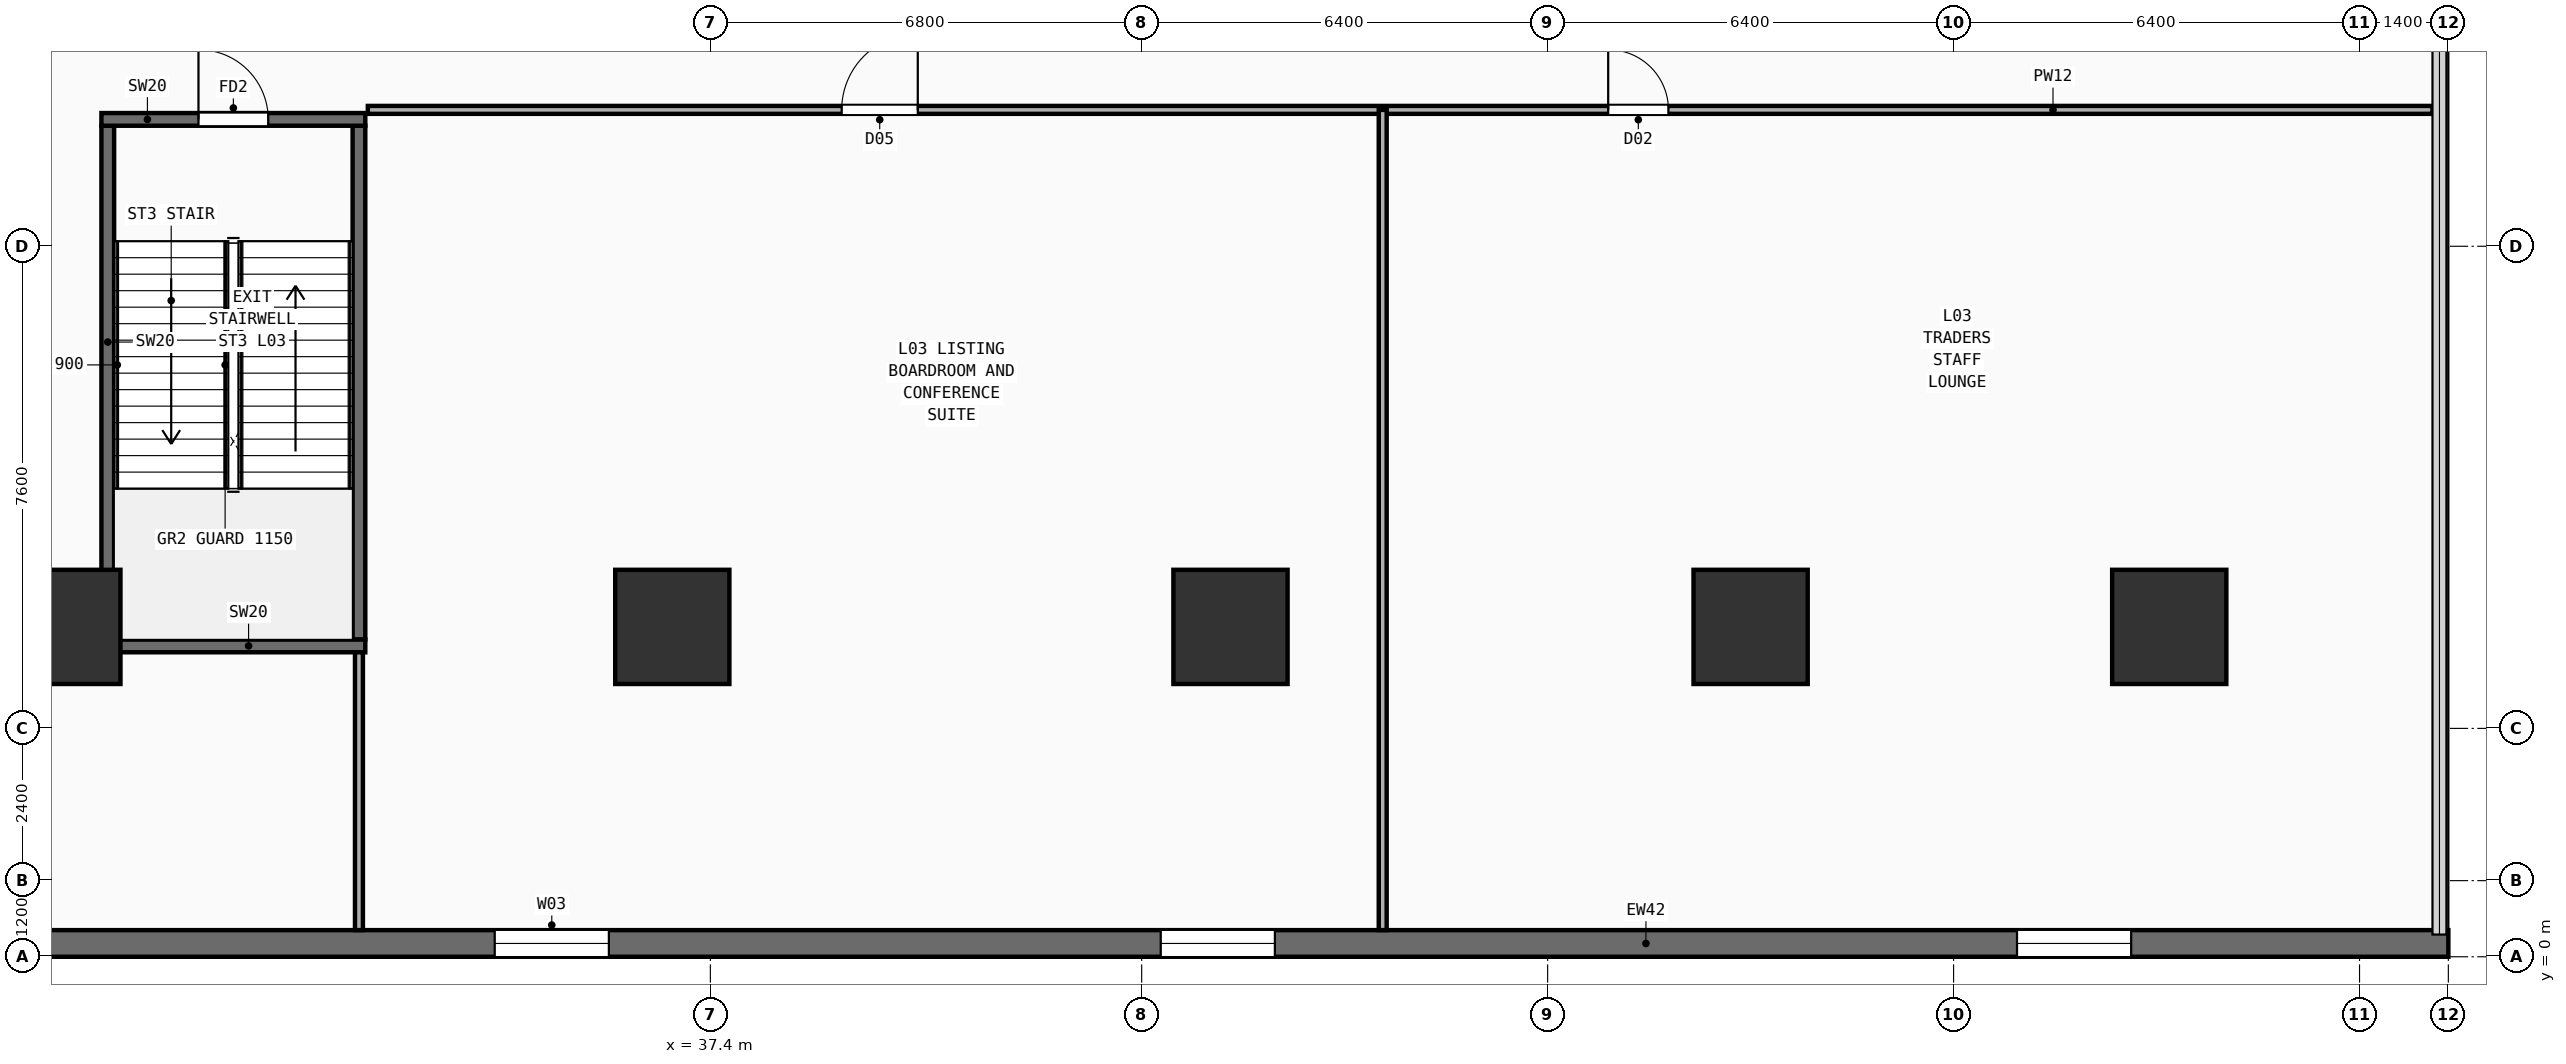
"""IFC4 building model, lengths in metres.
Left out: names, types, materials, properties, quantities, classifications, styles, units other than length and angle.
Written with IfcOpenShell. Run it as: python <this file> out.ifc"""

import sys

from ifc_helpers import new_model, si_unit, direction, frame, frame_2d, origin, origin_2d, place, context, subcontext, project, spatial, rectangle, extrude, element, fill, save


model = new_model("IFC4")
c1 = context("Model", 3, precision=1e-05, world=origin(), true_north=direction((0.0, 1.0)))
c2 = subcontext(c1, "Body", "Model", "MODEL_VIEW")
j1 = project(units=[si_unit("LENGTHUNIT", "METRE"), si_unit("PLANEANGLEUNIT", "RADIAN")], contexts=[c1])
p1 = place(None, origin())
s1 = spatial("IfcSite", under=j1, at=p1, CompositionType="ELEMENT")
p2 = place(p1, origin())
s2 = spatial("IfcBuilding", under=s1, at=p2, CompositionType="ELEMENT")
p3 = place(p2, frame((0.0, 0.0, 10.4)))
s3 = spatial("IfcBuildingStorey", under=s2, at=p3, CompositionType="ELEMENT", Elevation=10.4)
for number, where, z_axis, x_axis in (
    (1, (27.2, 5.2, 0.0), (0.0, 0.0, 1.0), (1.0, 0.0, 0.0)),
    (2, (36.8, 5.2, 0.0), (0.0, 0.0, 1.0), (1.0, 0.0, 0.0)),
    (3, (45.6, 5.2, 0.0), (0.0, 0.0, 1.0), (1.0, 0.0, 0.0)),
    (4, (53.8, 5.2, 0.0), (0.0, 0.0, 1.0), (1.0, 0.0, 0.0)),
    (5, (60.4, 5.2, 0.0), (0.0, 0.0, 1.0), (1.0, 0.0, 0.0)),
):
    element("IfcColumn", number, at=place(p3, frame(where, z_axis=z_axis, x_axis=x_axis)), inside=s3, PredefinedType="COLUMN", context=c2, shape_type="SweptSolid", body=[
        extrude(rectangle(XDim=1.8, YDim=1.8, at=origin_2d()), origin(), (0.0, 0.0, 1.0), 4.46),
    ])
p4 = place(p3, frame((0.0, 0.21, 0.0), z_axis=(0.0, 0.0, 1.0), x_axis=(1.0, 0.0, 0.0)))
e6 = element("IfcWall", 6, at=p4, inside=s3, PredefinedType="SOLIDWALL", context=c2, shape_type="SweptSolid", body=[
    extrude(rectangle(XDim=64.8, YDim=0.42, at=frame_2d((32.4, 0.0))), origin(), (0.0, 0.0, 1.0), 4.46),
])
p5 = place(p4, frame((8.0, 0.0, 0.95)))
e7 = element("IfcOpeningElement", 7, at=p5, cuts=e6, PredefinedType="OPENING", context=c2, shape_type="SweptSolid", body=[
    extrude(rectangle(XDim=1.8, YDim=2.1, at=frame_2d((0.9, 1.05))), frame((0.0, 0.22, 0.0), z_axis=(0.0, -1.0, 0.0), x_axis=(1.0, 0.0, 0.0)), (0.0, 0.0, 1.0), 0.44),
])
p6 = place(p4, frame((16.0, 0.0, 0.95)))
e8 = element("IfcOpeningElement", 8, at=p6, cuts=e6, PredefinedType="OPENING", context=c2, shape_type="SweptSolid", body=[
    extrude(rectangle(XDim=1.8, YDim=2.1, at=frame_2d((0.9, 1.05))), frame((0.0, 0.22, 0.0), z_axis=(0.0, -1.0, 0.0), x_axis=(1.0, 0.0, 0.0)), (0.0, 0.0, 1.0), 0.44),
])
p7 = place(p4, frame((24.0, 0.0, 0.95)))
e9 = element("IfcOpeningElement", 9, at=p7, cuts=e6, PredefinedType="OPENING", context=c2, shape_type="SweptSolid", body=[
    extrude(rectangle(XDim=1.8, YDim=2.1, at=frame_2d((0.9, 1.05))), frame((0.0, 0.22, 0.0), z_axis=(0.0, -1.0, 0.0), x_axis=(1.0, 0.0, 0.0)), (0.0, 0.0, 1.0), 0.44),
])
p8 = place(p4, frame((34.0, 0.0, 0.95)))
e10 = element("IfcOpeningElement", 10, at=p8, cuts=e6, PredefinedType="OPENING", context=c2, shape_type="SweptSolid", body=[
    extrude(rectangle(XDim=1.8, YDim=2.1, at=frame_2d((0.9, 1.05))), frame((0.0, 0.22, 0.0), z_axis=(0.0, -1.0, 0.0), x_axis=(1.0, 0.0, 0.0)), (0.0, 0.0, 1.0), 0.44),
])
p9 = place(p4, frame((44.5, 0.0, 0.95)))
e11 = element("IfcOpeningElement", 11, at=p9, cuts=e6, PredefinedType="OPENING", context=c2, shape_type="SweptSolid", body=[
    extrude(rectangle(XDim=1.8, YDim=2.1, at=frame_2d((0.9, 1.05))), frame((0.0, 0.22, 0.0), z_axis=(0.0, -1.0, 0.0), x_axis=(1.0, 0.0, 0.0)), (0.0, 0.0, 1.0), 0.44),
])
p10 = place(p4, frame((58.0, 0.0, 0.95)))
e12 = element("IfcOpeningElement", 12, at=p10, cuts=e6, PredefinedType="OPENING", context=c2, shape_type="SweptSolid", body=[
    extrude(rectangle(XDim=1.8, YDim=2.1, at=frame_2d((0.9, 1.05))), frame((0.0, 0.22, 0.0), z_axis=(0.0, -1.0, 0.0), x_axis=(1.0, 0.0, 0.0)), (0.0, 0.0, 1.0), 0.44),
])
for number, where, z_axis, x_axis in (
    (13, (27.9, 5.0, 0.0), (0.0, 0.0, 1.0), (0.0, 1.0, 0.0)),
    (14, (31.86, 5.0, 0.0), (0.0, 0.0, 1.0), (0.0, 1.0, 0.0)),
):
    element("IfcWall", number, at=place(p3, frame(where, z_axis=z_axis, x_axis=x_axis)), inside=s3, PredefinedType="SHEAR", context=c2, shape_type="SweptSolid", body=[
        extrude(rectangle(XDim=8.1, YDim=0.2, at=frame_2d((4.05, 0.0))), origin(), (0.0, 0.0, 1.0), 4.46),
    ])
p11 = place(p3, frame((27.8, 4.9, 0.0), z_axis=(0.0, 0.0, 1.0), x_axis=(1.0, 0.0, 0.0)))
e15 = element("IfcWall", 15, at=p11, inside=s3, PredefinedType="SHEAR", context=c2, shape_type="SweptSolid", body=[
    extrude(rectangle(XDim=4.16, YDim=0.2, at=frame_2d((2.08, 0.0))), origin(), (0.0, 0.0, 1.0), 4.46),
])
p12 = place(p3, frame((27.8, 13.2, 0.0), z_axis=(0.0, 0.0, 1.0), x_axis=(1.0, 0.0, 0.0)))
e16 = element("IfcWall", 16, at=p12, inside=s3, PredefinedType="SHEAR", context=c2, shape_type="SweptSolid", body=[
    extrude(rectangle(XDim=4.16, YDim=0.2, at=frame_2d((2.08, 0.0))), origin(), (0.0, 0.0, 1.0), 4.46),
])
p13 = place(p12, frame((1.53, 0.0, 0.0)))
e17 = element("IfcOpeningElement", 17, at=p13, cuts=e16, PredefinedType="OPENING", context=c2, shape_type="SweptSolid", body=[
    extrude(rectangle(XDim=1.1, YDim=2.2, at=frame_2d((0.55, 1.1))), frame((0.0, 0.11, 0.0), z_axis=(0.0, -1.0, 0.0), x_axis=(1.0, 0.0, 0.0)), (0.0, 0.0, 1.0), 0.22),
])
p14 = place(p3, frame((32.0, 13.35, 0.0), z_axis=(0.0, 0.0, 1.0), x_axis=(1.0, 0.0, 0.0)))
e18 = element("IfcWall", 18, at=p14, inside=s3, PredefinedType="PARTITIONING", context=c2, shape_type="SweptSolid", body=[
    extrude(rectangle(XDim=32.55, YDim=0.125, at=frame_2d((16.275, 0.0))), origin(), (0.0, 0.0, 1.0), 3.96),
])
p15 = place(p14, frame((7.47, 0.0, 0.0)))
e19 = element("IfcOpeningElement", 19, at=p15, cuts=e18, PredefinedType="OPENING", context=c2, shape_type="SweptSolid", body=[
    extrude(rectangle(XDim=1.2, YDim=2.25, at=frame_2d((0.6, 1.125))), frame((0.0, 0.073, 0.0), z_axis=(0.0, -1.0, 0.0), x_axis=(1.0, 0.0, 0.0)), (0.0, 0.0, 1.0), 0.145),
])
p16 = place(p14, frame((19.555, 0.0, 0.0)))
e20 = element("IfcOpeningElement", 20, at=p16, cuts=e18, PredefinedType="OPENING", context=c2, shape_type="SweptSolid", body=[
    extrude(rectangle(XDim=0.95, YDim=2.15, at=frame_2d((0.475, 1.075))), frame((0.0, 0.073, 0.0), z_axis=(0.0, -1.0, 0.0), x_axis=(1.0, 0.0, 0.0)), (0.0, 0.0, 1.0), 0.145),
])
p17 = place(p3, frame((31.86, 0.42, 0.0), z_axis=(0.0, 0.0, 1.0), x_axis=(0.0, 1.0, 0.0)))
e21 = element("IfcWall", 21, at=p17, inside=s3, PredefinedType="PARTITIONING", context=c2, shape_type="SweptSolid", body=[
    extrude(rectangle(XDim=4.38, YDim=0.125, at=frame_2d((2.19, 0.0))), origin(), (0.0, 0.0, 1.0), 4.46),
])
p18 = place(p3, frame((48.0, 0.42, 0.0), z_axis=(0.0, 0.0, 1.0), x_axis=(0.0, 1.0, 0.0)))
e22 = element("IfcWall", 22, at=p18, inside=s3, PredefinedType="PARTITIONING", context=c2, shape_type="SweptSolid", body=[
    extrude(rectangle(XDim=12.93, YDim=0.125, at=frame_2d((6.465, 0.0))), origin(), (0.0, 0.0, 1.0), 4.46),
])
p19 = place(p8, origin())
e23 = element("IfcWindow", 23, at=p19, inside=s3, PartitioningType="SINGLE_PANEL", PredefinedType="WINDOW", context=c2, shape_type="SweptSolid", body=[
    extrude(rectangle(XDim=1.8, YDim=2.1, at=frame_2d((0.9, 1.05))), frame((0.0, 0.03, 0.0), z_axis=(0.0, -1.0, 0.0), x_axis=(1.0, 0.0, 0.0)), (0.0, 0.0, 1.0), 0.06),
])
fill(e10, e23)
p20 = place(p9, origin())
e24 = element("IfcWindow", 24, at=p20, inside=s3, PartitioningType="SINGLE_PANEL", PredefinedType="WINDOW", context=c2, shape_type="SweptSolid", body=[
    extrude(rectangle(XDim=1.8, YDim=2.1, at=frame_2d((0.9, 1.05))), frame((0.0, 0.03, 0.0), z_axis=(0.0, -1.0, 0.0), x_axis=(1.0, 0.0, 0.0)), (0.0, 0.0, 1.0), 0.06),
])
fill(e11, e24)
p21 = place(p10, origin())
e25 = element("IfcWindow", 25, at=p21, inside=s3, PartitioningType="SINGLE_PANEL", PredefinedType="WINDOW", context=c2, shape_type="SweptSolid", body=[
    extrude(rectangle(XDim=1.8, YDim=2.1, at=frame_2d((0.9, 1.05))), frame((0.0, 0.03, 0.0), z_axis=(0.0, -1.0, 0.0), x_axis=(1.0, 0.0, 0.0)), (0.0, 0.0, 1.0), 0.06),
])
fill(e12, e25)
p22 = place(p13, frame((1.1, 0.0, 0.0), z_axis=(0.0, 0.0, 1.0), x_axis=(-1.0, 0.0, 0.0)))
e26 = element("IfcDoor", 26, at=p22, inside=s3, OperationType="SINGLE_SWING_RIGHT", PredefinedType="DOOR", context=c2, shape_type="SweptSolid", body=[
    extrude(rectangle(XDim=1.1, YDim=2.2, at=frame_2d((0.55, 1.1))), frame((0.0, 0.025, 0.0), z_axis=(0.0, -1.0, 0.0), x_axis=(1.0, 0.0, 0.0)), (0.0, 0.0, 1.0), 0.05),
])
fill(e17, e26)
p23 = place(p15, origin())
e27 = element("IfcDoor", 27, at=p23, inside=s3, OperationType="SINGLE_SWING_RIGHT", PredefinedType="DOOR", context=c2, shape_type="SweptSolid", body=[
    extrude(rectangle(XDim=1.2, YDim=2.25, at=frame_2d((0.6, 1.125))), frame((0.0, 0.025, 0.0), z_axis=(0.0, -1.0, 0.0), x_axis=(1.0, 0.0, 0.0)), (0.0, 0.0, 1.0), 0.05),
])
fill(e19, e27)
p24 = place(p16, origin())
e28 = element("IfcDoor", 28, at=p24, inside=s3, OperationType="SINGLE_SWING_LEFT", PredefinedType="DOOR", context=c2, shape_type="SweptSolid", body=[
    extrude(rectangle(XDim=0.95, YDim=2.15, at=frame_2d((0.475, 1.075))), frame((0.0, 0.025, 0.0), z_axis=(0.0, -1.0, 0.0), x_axis=(1.0, 0.0, 0.0)), (0.0, 0.0, 1.0), 0.05),
])
fill(e20, e28)
save(model, sys.argv[1])
